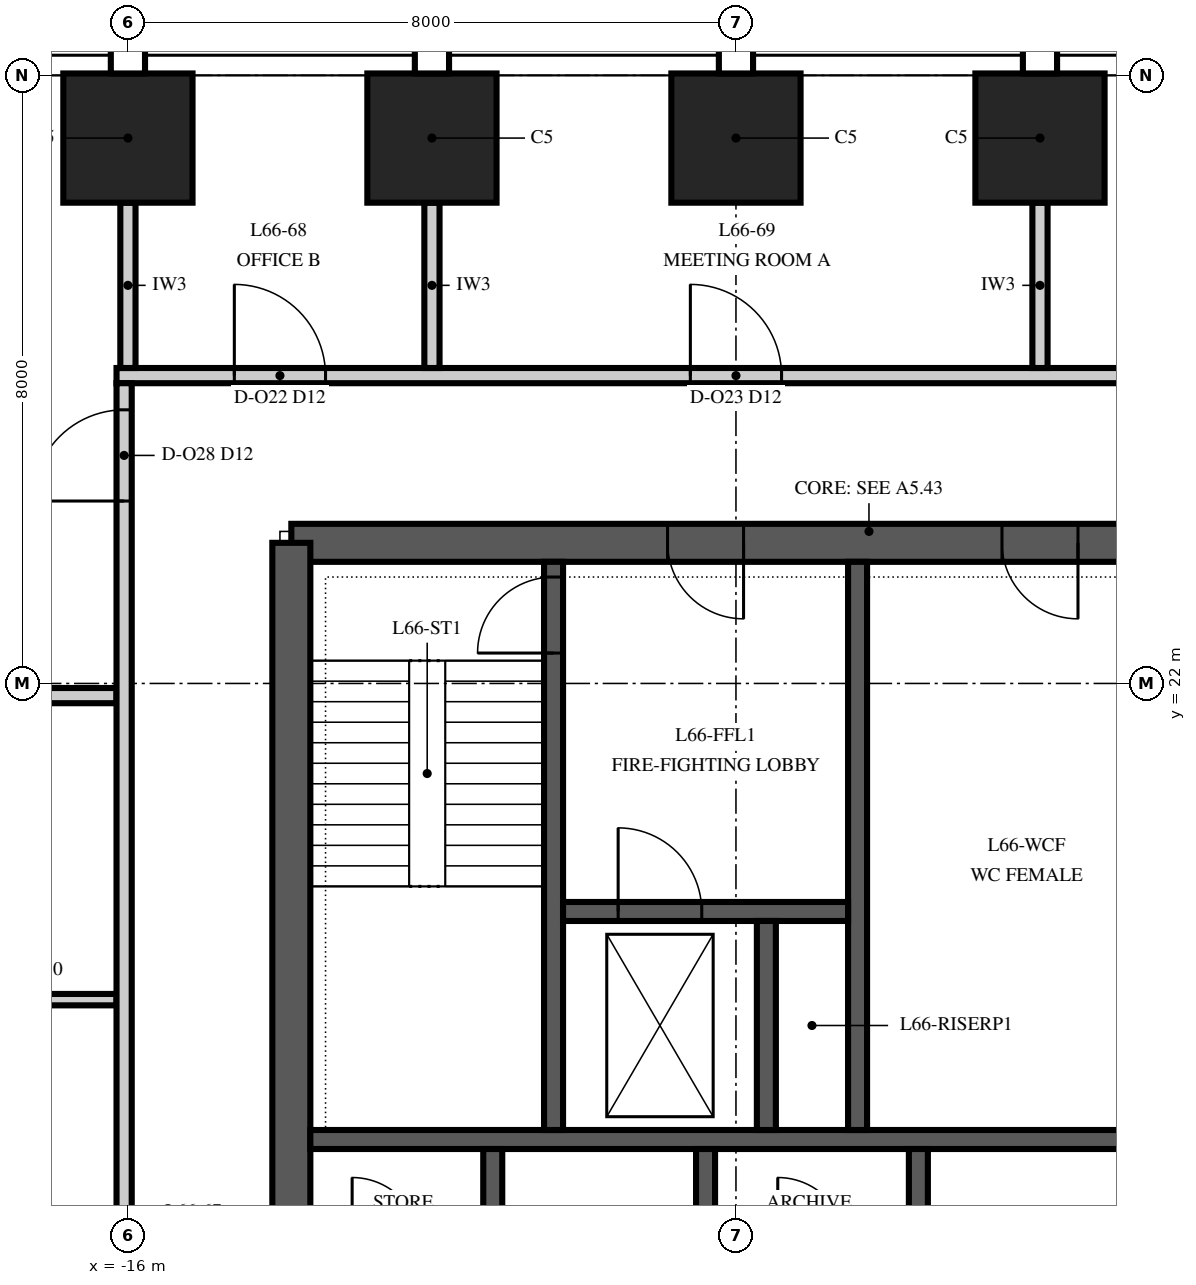
"""IFC4 building model, lengths in metres.
Left out: names, types, materials, properties, quantities, classifications, styles, units other than length and angle.
Written with IfcOpenShell. Run it as: python <this file> out.ifc"""

import sys

from ifc_helpers import new_model, si_unit, direction, frame, frame_2d, origin, origin_2d, place, context, subcontext, project, spatial, polyline, rectangle, outline, extrude, element, fill, save


model = new_model("IFC4")
c1 = context("Model", 3, precision=1e-05, world=origin(), true_north=direction((0.0, 1.0)))
c2 = subcontext(c1, "Body", "Model", "MODEL_VIEW")
j1 = project(units=[si_unit("LENGTHUNIT", "METRE"), si_unit("PLANEANGLEUNIT", "RADIAN")], contexts=[c1])
p1 = place(None, origin())
s1 = spatial("IfcSite", under=j1, at=p1, CompositionType="ELEMENT")
p2 = place(p1, origin())
s2 = spatial("IfcBuilding", under=s1, at=p2, CompositionType="ELEMENT")
p3 = place(p2, frame((0.0, 0.0, 284.0)))
s3 = spatial("IfcBuildingStorey", under=s2, at=p3, CompositionType="ELEMENT", Elevation=284.0)
for number, where, z_axis, x_axis in (
    (1, (-4.0, 29.175, 0.0), (0.0, 0.0, 1.0), (-1.0, 0.0, 0.0)),
    (2, (-8.0, 29.175, 0.0), (0.0, 0.0, 1.0), (-1.0, 0.0, 0.0)),
    (3, (-12.0, 29.175, 0.0), (0.0, 0.0, 1.0), (-1.0, 0.0, 0.0)),
    (4, (-16.0, 29.175, 0.0), (0.0, 0.0, 1.0), (-1.0, 0.0, 0.0)),
):
    element("IfcColumn", number, at=place(p3, frame(where, z_axis=z_axis, x_axis=x_axis)), inside=s3, PredefinedType="COLUMN", context=c2, shape_type="SweptSolid", body=[
        extrude(rectangle(XDim=1.7, YDim=1.7, at=origin_2d()), origin(), (0.0, 0.0, 1.0), 4.0),
    ])
p4 = place(p3, frame((13.85, 23.85, 0.0), z_axis=(0.0, 0.0, 1.0), x_axis=(-1.0, 0.0, 0.0)))
e5 = element("IfcWall", 5, at=p4, inside=s3, PredefinedType="SHEAR", context=c2, shape_type="SweptSolid", body=[
    extrude(rectangle(XDim=27.7, YDim=0.5, at=frame_2d((13.85, 0.0))), origin(), (0.0, 0.0, 1.0), 4.0),
])
p5 = place(p4, frame((21.75, 0.0, 0.0)))
e6 = element("IfcOpeningElement", 6, at=p5, cuts=e5, PredefinedType="OPENING", context=c2, shape_type="SweptSolid", body=[
    extrude(rectangle(XDim=1.0, YDim=2.1, at=frame_2d((0.5, 1.05))), frame((0.0, 0.265, 0.0), z_axis=(0.0, -1.0, 0.0), x_axis=(1.0, 0.0, 0.0)), (0.0, 0.0, 1.0), 0.53),
])
p6 = place(p4, frame((4.95, 0.0, 0.0)))
e7 = element("IfcOpeningElement", 7, at=p6, cuts=e5, PredefinedType="OPENING", context=c2, shape_type="SweptSolid", body=[
    extrude(rectangle(XDim=1.0, YDim=2.1, at=frame_2d((0.5, 1.05))), frame((0.0, 0.265, 0.0), z_axis=(0.0, -1.0, 0.0), x_axis=(1.0, 0.0, 0.0)), (0.0, 0.0, 1.0), 0.53),
])
p7 = place(p4, frame((17.35, 0.0, 0.0)))
e8 = element("IfcOpeningElement", 8, at=p7, cuts=e5, PredefinedType="OPENING", context=c2, shape_type="SweptSolid", body=[
    extrude(rectangle(XDim=1.0, YDim=2.1, at=frame_2d((0.5, 1.05))), frame((0.0, 0.265, 0.0), z_axis=(0.0, -1.0, 0.0), x_axis=(1.0, 0.0, 0.0)), (0.0, 0.0, 1.0), 0.53),
])
p8 = place(p4, frame((13.35, 0.0, 0.0)))
e9 = element("IfcOpeningElement", 9, at=p8, cuts=e5, PredefinedType="OPENING", context=c2, shape_type="SweptSolid", body=[
    extrude(rectangle(XDim=1.0, YDim=2.1, at=frame_2d((0.5, 1.05))), frame((0.0, 0.265, 0.0), z_axis=(0.0, -1.0, 0.0), x_axis=(1.0, 0.0, 0.0)), (0.0, 0.0, 1.0), 0.53),
])
p9 = place(p4, frame((9.35, 0.0, 0.0)))
e10 = element("IfcOpeningElement", 10, at=p9, cuts=e5, PredefinedType="OPENING", context=c2, shape_type="SweptSolid", body=[
    extrude(rectangle(XDim=1.0, YDim=2.1, at=frame_2d((0.5, 1.05))), frame((0.0, 0.265, 0.0), z_axis=(0.0, -1.0, 0.0), x_axis=(1.0, 0.0, 0.0)), (0.0, 0.0, 1.0), 0.53),
])
p10 = place(p3, frame((-13.85, 23.85, 0.0), z_axis=(0.0, 0.0, 1.0), x_axis=(0.0, -1.0, 0.0)))
e11 = element("IfcWall", 11, at=p10, inside=s3, PredefinedType="SHEAR", context=c2, shape_type="SweptSolid", body=[
    extrude(outline(polyline([(0.0, -0.25), (17.7, -0.25), (17.7, 0.0), (17.45, 0.0), (17.45, 0.25), (0.25, 0.25), (0.25, 0.0), (0.0, 0.0), (0.0, -0.25)])), origin(), (0.0, 0.0, 1.0), 4.0),
])
p11 = place(p10, frame((11.75, 0.0, 0.0)))
e12 = element("IfcOpeningElement", 12, at=p11, cuts=e11, PredefinedType="OPENING", context=c2, shape_type="SweptSolid", body=[
    extrude(rectangle(XDim=1.8, YDim=2.4, at=frame_2d((0.9, 1.2))), frame((0.0, 0.265, 0.0), z_axis=(0.0, -1.0, 0.0), x_axis=(1.0, 0.0, 0.0)), (0.0, 0.0, 1.0), 0.53),
])
p12 = place(p3, frame((-13.6, 16.0, 0.0), z_axis=(0.0, 0.0, 1.0), x_axis=(1.0, 0.0, 0.0)))
e13 = element("IfcWall", 13, at=p12, inside=s3, PredefinedType="SHEAR", context=c2, shape_type="SweptSolid", body=[
    extrude(rectangle(XDim=27.2, YDim=0.25, at=frame_2d((13.6, 0.0))), origin(), (0.0, 0.0, 1.0), 4.0),
])
for number, where, z_axis, x_axis in (
    (14, (-11.2, 13.125, 0.0), (0.0, 0.0, 1.0), (0.0, 1.0, 0.0)),
    (15, (-8.4, 13.125, 0.0), (0.0, 0.0, 1.0), (0.0, 1.0, 0.0)),
    (16, (-5.6, 13.125, 0.0), (0.0, 0.0, 1.0), (0.0, 1.0, 0.0)),
):
    element("IfcWall", number, at=place(p3, frame(where, z_axis=z_axis, x_axis=x_axis)), inside=s3, PredefinedType="SHEAR", context=c2, shape_type="SweptSolid", body=[
        extrude(rectangle(XDim=2.75, YDim=0.25, at=frame_2d((1.375, 0.0))), origin(), (0.0, 0.0, 1.0), 4.0),
    ])
p13 = place(p3, frame((-10.4, 16.125, 0.0), z_axis=(0.0, 0.0, 1.0), x_axis=(0.0, 1.0, 0.0)))
e17 = element("IfcWall", 17, at=p13, inside=s3, PredefinedType="SHEAR", context=c2, shape_type="SweptSolid", body=[
    extrude(rectangle(XDim=7.475, YDim=0.25, at=frame_2d((3.738, 0.0))), origin(), (0.0, 0.0, 1.0), 4.0),
])
p14 = place(p13, frame((6.275, 0.0, 0.0)))
e18 = element("IfcOpeningElement", 18, at=p14, cuts=e17, PredefinedType="OPENING", context=c2, shape_type="SweptSolid", body=[
    extrude(rectangle(XDim=1.0, YDim=2.1, at=frame_2d((0.5, 1.05))), frame((0.0, 0.14, 0.0), z_axis=(0.0, -1.0, 0.0), x_axis=(1.0, 0.0, 0.0)), (0.0, 0.0, 1.0), 0.28),
])
p15 = place(p3, frame((-6.4, 16.125, 0.0), z_axis=(0.0, 0.0, 1.0), x_axis=(0.0, 1.0, 0.0)))
e19 = element("IfcWall", 19, at=p15, inside=s3, PredefinedType="SHEAR", context=c2, shape_type="SweptSolid", body=[
    extrude(rectangle(XDim=7.475, YDim=0.25, at=frame_2d((3.738, 0.0))), origin(), (0.0, 0.0, 1.0), 4.0),
])
p16 = place(p3, frame((-10.275, 19.0, 0.0), z_axis=(0.0, 0.0, 1.0), x_axis=(1.0, 0.0, 0.0)))
e20 = element("IfcWall", 20, at=p16, inside=s3, PredefinedType="SHEAR", context=c2, shape_type="SweptSolid", body=[
    extrude(rectangle(XDim=3.75, YDim=0.25, at=frame_2d((1.875, 0.0))), origin(), (0.0, 0.0, 1.0), 4.0),
])
p17 = place(p16, frame((0.725, 0.0, 0.0)))
e21 = element("IfcOpeningElement", 21, at=p17, cuts=e20, PredefinedType="OPENING", context=c2, shape_type="SweptSolid", body=[
    extrude(rectangle(XDim=1.1, YDim=2.1, at=frame_2d((0.55, 1.05))), frame((0.0, 0.14, 0.0), z_axis=(0.0, -1.0, 0.0), x_axis=(1.0, 0.0, 0.0)), (0.0, 0.0, 1.0), 0.28),
])
p18 = place(p3, frame((-7.6, 16.125, 0.0), z_axis=(0.0, 0.0, 1.0), x_axis=(0.0, 1.0, 0.0)))
e22 = element("IfcWall", 22, at=p18, inside=s3, PredefinedType="SHEAR", context=c2, shape_type="SweptSolid", body=[
    extrude(rectangle(XDim=2.75, YDim=0.25, at=frame_2d((1.375, 0.0))), origin(), (0.0, 0.0, 1.0), 4.0),
])
p19 = place(p3, frame((-19.725, 17.84, 0.0), z_axis=(0.0, 0.0, 1.0), x_axis=(1.0, 0.0, 0.0)))
e23 = element("IfcWall", 23, at=p19, inside=s3, PredefinedType="PARTITIONING", context=c2, shape_type="SweptSolid", body=[
    extrude(rectangle(XDim=3.575, YDim=0.15, at=frame_2d((1.788, 0.0))), origin(), (0.0, 0.0, 1.0), 3.23),
])
p20 = place(p19, frame((1.375, 0.0, 0.0)))
e24 = element("IfcOpeningElement", 24, at=p20, cuts=e23, PredefinedType="OPENING", context=c2, shape_type="SweptSolid", body=[
    extrude(rectangle(XDim=1.0, YDim=2.3, at=frame_2d((0.5, 1.15))), frame((0.0, 0.09, 0.0), z_axis=(0.0, -1.0, 0.0), x_axis=(1.0, 0.0, 0.0)), (0.0, 0.0, 1.0), 0.18),
])
p21 = place(p3, frame((-23.324, 21.84, 0.0), z_axis=(0.0, 0.0, 1.0), x_axis=(1.0, 0.0, 0.0)))
e25 = element("IfcWall", 25, at=p21, inside=s3, PredefinedType="PARTITIONING", context=c2, shape_type="SweptSolid", body=[
    extrude(rectangle(XDim=7.174, YDim=0.2, at=frame_2d((3.587, 0.0))), origin(), (0.0, 0.0, 1.0), 3.23),
])
p22 = place(p3, frame((-16.15, 26.05, 0.0), z_axis=(0.0, 0.0, 1.0), x_axis=(1.0, 0.0, 0.0)))
e26 = element("IfcWall", 26, at=p22, inside=s3, PredefinedType="PARTITIONING", context=c2, shape_type="SweptSolid", body=[
    extrude(rectangle(XDim=32.3, YDim=0.2, at=frame_2d((16.15, 0.0))), origin(), (0.0, 0.0, 1.0), 3.418),
])
p23 = place(p22, frame((1.55, 0.0, 0.0)))
e27 = element("IfcOpeningElement", 27, at=p23, cuts=e26, PredefinedType="OPENING", context=c2, shape_type="SweptSolid", body=[
    extrude(rectangle(XDim=1.2, YDim=2.4, at=frame_2d((0.6, 1.2))), frame((0.0, 0.115, 0.0), z_axis=(0.0, -1.0, 0.0), x_axis=(1.0, 0.0, 0.0)), (0.0, 0.0, 1.0), 0.23),
])
p24 = place(p22, frame((7.55, 0.0, 0.0)))
e28 = element("IfcOpeningElement", 28, at=p24, cuts=e26, PredefinedType="OPENING", context=c2, shape_type="SweptSolid", body=[
    extrude(rectangle(XDim=1.2, YDim=2.4, at=frame_2d((0.6, 1.2))), frame((0.0, 0.115, 0.0), z_axis=(0.0, -1.0, 0.0), x_axis=(1.0, 0.0, 0.0)), (0.0, 0.0, 1.0), 0.23),
])
p25 = place(p22, frame((13.55, 0.0, 0.0)))
e29 = element("IfcOpeningElement", 29, at=p25, cuts=e26, PredefinedType="OPENING", context=c2, shape_type="SweptSolid", body=[
    extrude(rectangle(XDim=1.2, YDim=2.4, at=frame_2d((0.6, 1.2))), frame((0.0, 0.115, 0.0), z_axis=(0.0, -1.0, 0.0), x_axis=(1.0, 0.0, 0.0)), (0.0, 0.0, 1.0), 0.23),
])
p26 = place(p22, frame((17.55, 0.0, 0.0)))
e30 = element("IfcOpeningElement", 30, at=p26, cuts=e26, PredefinedType="OPENING", context=c2, shape_type="SweptSolid", body=[
    extrude(rectangle(XDim=1.2, YDim=2.4, at=frame_2d((0.6, 1.2))), frame((0.0, 0.115, 0.0), z_axis=(0.0, -1.0, 0.0), x_axis=(1.0, 0.0, 0.0)), (0.0, 0.0, 1.0), 0.23),
])
p27 = place(p22, frame((23.55, 0.0, 0.0)))
e31 = element("IfcOpeningElement", 31, at=p27, cuts=e26, PredefinedType="OPENING", context=c2, shape_type="SweptSolid", body=[
    extrude(rectangle(XDim=1.2, YDim=2.4, at=frame_2d((0.6, 1.2))), frame((0.0, 0.115, 0.0), z_axis=(0.0, -1.0, 0.0), x_axis=(1.0, 0.0, 0.0)), (0.0, 0.0, 1.0), 0.23),
])
p28 = place(p22, frame((29.55, 0.0, 0.0)))
e32 = element("IfcOpeningElement", 32, at=p28, cuts=e26, PredefinedType="OPENING", context=c2, shape_type="SweptSolid", body=[
    extrude(rectangle(XDim=1.2, YDim=2.4, at=frame_2d((0.6, 1.2))), frame((0.0, 0.115, 0.0), z_axis=(0.0, -1.0, 0.0), x_axis=(1.0, 0.0, 0.0)), (0.0, 0.0, 1.0), 0.23),
])
p29 = place(p3, frame((-16.05, 1.94, 0.0), z_axis=(0.0, 0.0, 1.0), x_axis=(0.0, 1.0, 0.0)))
e33 = element("IfcWall", 33, at=p29, inside=s3, PredefinedType="PARTITIONING", context=c2, shape_type="SweptSolid", body=[
    extrude(rectangle(XDim=24.01, YDim=0.2, at=frame_2d((12.005, 0.0))), origin(), (0.0, 0.0, 1.0), 2.842),
])
p30 = place(p29, frame((8.46, 0.0, 0.0)))
e34 = element("IfcOpeningElement", 34, at=p30, cuts=e33, PredefinedType="OPENING", context=c2, shape_type="SweptSolid", body=[
    extrude(rectangle(XDim=1.2, YDim=2.4, at=frame_2d((0.6, 1.2))), frame((0.0, 0.115, 0.0), z_axis=(0.0, -1.0, 0.0), x_axis=(1.0, 0.0, 0.0)), (0.0, 0.0, 1.0), 0.23),
])
p31 = place(p29, frame((22.46, 0.0, 0.0)))
e35 = element("IfcOpeningElement", 35, at=p31, cuts=e33, PredefinedType="OPENING", context=c2, shape_type="SweptSolid", body=[
    extrude(rectangle(XDim=1.2, YDim=2.4, at=frame_2d((0.6, 1.2))), frame((0.0, 0.115, 0.0), z_axis=(0.0, -1.0, 0.0), x_axis=(1.0, 0.0, 0.0)), (0.0, 0.0, 1.0), 0.23),
])
for number, where, z_axis, x_axis in (
    (36, (-16.0, 26.15, 0.0), (0.0, 0.0, 1.0), (0.0, 1.0, 0.0)),
    (37, (-12.0, 26.15, 0.0), (0.0, 0.0, 1.0), (0.0, 1.0, 0.0)),
    (38, (-4.0, 26.15, 0.0), (0.0, 0.0, 1.0), (0.0, 1.0, 0.0)),
):
    element("IfcWall", number, at=place(p3, frame(where, z_axis=z_axis, x_axis=x_axis)), inside=s3, PredefinedType="PARTITIONING", context=c2, shape_type="SweptSolid", body=[
        extrude(rectangle(XDim=2.175, YDim=0.2, at=frame_2d((1.087, 0.0))), origin(), (0.0, 0.0, 1.0), 3.418),
    ])
p32 = place(p5, origin())
e39 = element("IfcDoor", 39, at=p32, inside=s3, OperationType="SINGLE_SWING_RIGHT", PredefinedType="DOOR", context=c2, shape_type="SweptSolid", body=[
    extrude(rectangle(XDim=1.0, YDim=2.1, at=frame_2d((0.5, 1.05))), frame((0.0, 0.25, 0.0), z_axis=(0.0, -1.0, 0.0), x_axis=(1.0, 0.0, 0.0)), (0.0, 0.0, 1.0), 0.5),
])
fill(e6, e39)
p33 = place(p7, origin())
e40 = element("IfcDoor", 40, at=p33, inside=s3, OperationType="SINGLE_SWING_LEFT", PredefinedType="DOOR", context=c2, shape_type="SweptSolid", body=[
    extrude(rectangle(XDim=1.0, YDim=2.1, at=frame_2d((0.5, 1.05))), frame((0.0, 0.25, 0.0), z_axis=(0.0, -1.0, 0.0), x_axis=(1.0, 0.0, 0.0)), (0.0, 0.0, 1.0), 0.5),
])
fill(e8, e40)
p34 = place(p14, origin())
e41 = element("IfcDoor", 41, at=p34, inside=s3, OperationType="SINGLE_SWING_LEFT", PredefinedType="DOOR", context=c2, shape_type="SweptSolid", body=[
    extrude(rectangle(XDim=1.0, YDim=2.1, at=frame_2d((0.5, 1.05))), frame((0.0, 0.125, 0.0), z_axis=(0.0, -1.0, 0.0), x_axis=(1.0, 0.0, 0.0)), (0.0, 0.0, 1.0), 0.25),
])
fill(e18, e41)
p35 = place(p17, origin())
e42 = element("IfcDoor", 42, at=p35, inside=s3, OperationType="SLIDING_TO_RIGHT", PredefinedType="DOOR", context=c2, shape_type="SweptSolid", body=[
    extrude(rectangle(XDim=1.1, YDim=2.1, at=frame_2d((0.55, 1.05))), frame((0.0, 0.125, 0.0), z_axis=(0.0, -1.0, 0.0), x_axis=(1.0, 0.0, 0.0)), (0.0, 0.0, 1.0), 0.25),
])
fill(e21, e42)
p36 = place(p23, origin())
e43 = element("IfcDoor", 43, at=p36, inside=s3, OperationType="SINGLE_SWING_LEFT", PredefinedType="DOOR", context=c2, shape_type="SweptSolid", body=[
    extrude(rectangle(XDim=1.2, YDim=2.4, at=frame_2d((0.6, 1.2))), frame((0.0, 0.1, 0.0), z_axis=(0.0, -1.0, 0.0), x_axis=(1.0, 0.0, 0.0)), (0.0, 0.0, 1.0), 0.199),
])
fill(e27, e43)
p37 = place(p24, origin())
e44 = element("IfcDoor", 44, at=p37, inside=s3, OperationType="SINGLE_SWING_LEFT", PredefinedType="DOOR", context=c2, shape_type="SweptSolid", body=[
    extrude(rectangle(XDim=1.2, YDim=2.4, at=frame_2d((0.6, 1.2))), frame((0.0, 0.1, 0.0), z_axis=(0.0, -1.0, 0.0), x_axis=(1.0, 0.0, 0.0)), (0.0, 0.0, 1.0), 0.199),
])
fill(e28, e44)
p38 = place(p31, origin())
e45 = element("IfcDoor", 45, at=p38, inside=s3, OperationType="SINGLE_SWING_LEFT", PredefinedType="DOOR", context=c2, shape_type="SweptSolid", body=[
    extrude(rectangle(XDim=1.2, YDim=2.4, at=frame_2d((0.6, 1.2))), frame((0.0, 0.1, 0.0), z_axis=(0.0, -1.0, 0.0), x_axis=(1.0, 0.0, 0.0)), (0.0, 0.0, 1.0), 0.199),
])
fill(e35, e45)
save(model, sys.argv[1])
